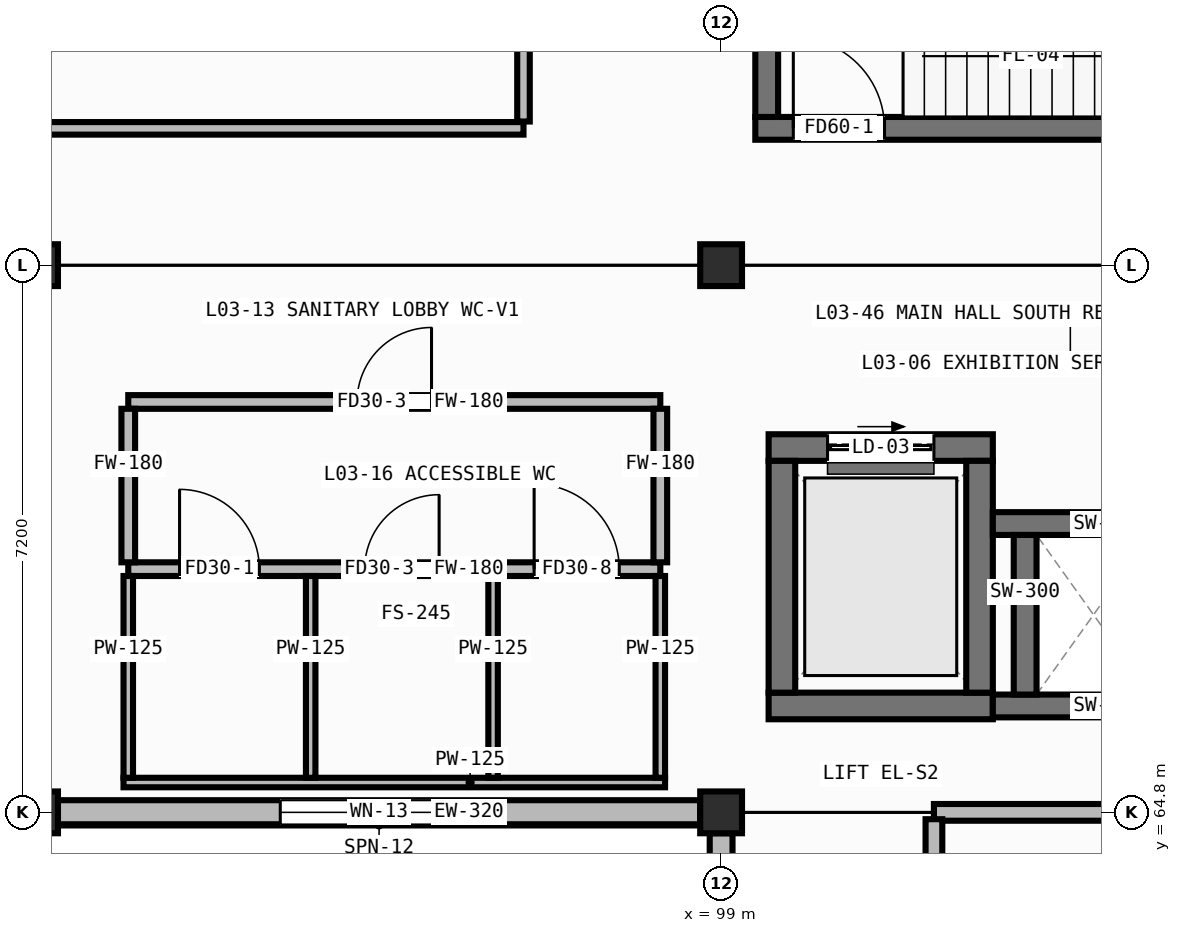
"""IFC4 building model, lengths in metres.
Left out: names, types, materials, properties, quantities, classifications, styles, units other than length and angle.
Written with IfcOpenShell. Run it as: python <this file> out.ifc"""

import sys

from ifc_helpers import new_model, si_unit, direction, frame, frame_2d, origin, origin_2d, place, context, subcontext, project, spatial, rectangle, hollow_rectangle, extrude, element, fill, save


model = new_model("IFC4")
c1 = context("Model", 3, precision=1e-05, world=origin(), true_north=direction((0.0, 1.0)))
c2 = subcontext(c1, "Body", "Model", "MODEL_VIEW")
j1 = project(units=[si_unit("LENGTHUNIT", "METRE"), si_unit("PLANEANGLEUNIT", "RADIAN")], contexts=[c1])
p1 = place(None, origin())
s1 = spatial("IfcSite", under=j1, at=p1, CompositionType="ELEMENT")
p2 = place(p1, origin())
s2 = spatial("IfcBuilding", under=s1, at=p2, CompositionType="ELEMENT")
p3 = place(p2, frame((0.0, 0.0, 8.8)))
s3 = spatial("IfcBuildingStorey", under=s2, at=p3, CompositionType="ELEMENT", Elevation=8.8)
for number, where, z_axis, x_axis in (
    (1, (90.0, 64.8, 0.0), (0.0, 0.0, 1.0), (1.0, 0.0, 0.0)),
    (2, (90.0, 72.0, 0.0), (0.0, 0.0, 1.0), (1.0, 0.0, 0.0)),
):
    element("IfcColumn", number, at=place(p3, frame(where, z_axis=z_axis, x_axis=x_axis)), inside=s3, PredefinedType="COLUMN", context=c2, shape_type="SweptSolid", body=[
        extrude(hollow_rectangle(XDim=0.55, YDim=0.55, WallThickness=0.022, at=origin_2d()), origin(), (0.0, 0.0, 1.0), 4.0),
    ])
for number, where, z_axis, x_axis in (
    (3, (99.0, 64.8, 0.0), (0.0, 0.0, 1.0), (1.0, 0.0, 0.0)),
    (4, (99.0, 72.0, 0.0), (0.0, 0.0, 1.0), (1.0, 0.0, 0.0)),
):
    element("IfcColumn", number, at=place(p3, frame(where, z_axis=z_axis, x_axis=x_axis)), inside=s3, PredefinedType="COLUMN", context=c2, shape_type="SweptSolid", body=[
        extrude(hollow_rectangle(XDim=0.55, YDim=0.55, WallThickness=0.022, at=origin_2d()), origin(), (0.0, 0.0, 1.0), 3.745),
    ])
p4 = place(p3, frame((90.275, 64.8, 0.0), z_axis=(0.0, 0.0, 1.0), x_axis=(1.0, 0.0, 0.0)))
e5 = element("IfcWall", 5, at=p4, inside=s3, PredefinedType="STANDARD", context=c2, shape_type="SweptSolid", body=[
    extrude(rectangle(XDim=8.45, YDim=0.32, at=frame_2d((4.225, 0.0))), origin(), (0.0, 0.0, 1.0), 3.295),
])
p5 = place(p4, frame((2.925, 0.0, 0.85)))
e6 = element("IfcOpeningElement", 6, at=p5, cuts=e5, PredefinedType="OPENING", context=c2, shape_type="SweptSolid", body=[
    extrude(rectangle(XDim=2.6, YDim=1.6, at=frame_2d((1.3, 0.8))), frame((0.0, 0.172, 0.0), z_axis=(0.0, -1.0, 0.0), x_axis=(1.0, 0.0, 0.0)), (0.0, 0.0, 1.0), 0.344),
])
p6 = place(p3, frame((99.0, 57.875, 0.0), z_axis=(0.0, 0.0, 1.0), x_axis=(0.0, 1.0, 0.0)))
e7 = element("IfcWall", 7, at=p6, inside=s3, PredefinedType="STANDARD", context=c2, shape_type="SweptSolid", body=[
    extrude(rectangle(XDim=6.65, YDim=0.3, at=frame_2d((3.325, 0.0))), origin(), (0.0, 0.0, 1.0), 3.295),
])
p7 = place(p6, frame((2.025, 0.0, 0.85)))
e8 = element("IfcOpeningElement", 8, at=p7, cuts=e7, PredefinedType="OPENING", context=c2, shape_type="SweptSolid", body=[
    extrude(rectangle(XDim=2.6, YDim=1.6, at=frame_2d((1.3, 0.8))), frame((0.0, 0.162, 0.0), z_axis=(0.0, -1.0, 0.0), x_axis=(1.0, 0.0, 0.0)), (0.0, 0.0, 1.0), 0.324),
])
p8 = place(p3, frame((99.45, 73.8, 0.0), z_axis=(0.0, 0.0, 1.0), x_axis=(1.0, 0.0, 0.0)))
e9 = element("IfcWall", 9, at=p8, inside=s3, PredefinedType="SHEAR", context=c2, shape_type="SweptSolid", body=[
    extrude(rectangle(XDim=8.1, YDim=0.3, at=frame_2d((4.05, 0.0))), origin(), (0.0, 0.0, 1.0), 3.745),
])
p9 = place(p8, frame((0.5, 0.0, 0.0)))
e10 = element("IfcOpeningElement", 10, at=p9, cuts=e9, PredefinedType="OPENING", context=c2, shape_type="SweptSolid", body=[
    extrude(rectangle(XDim=1.2, YDim=2.1, at=frame_2d((0.6, 1.05))), frame((0.0, 0.162, 0.0), z_axis=(0.0, -1.0, 0.0), x_axis=(1.0, 0.0, 0.0)), (0.0, 0.0, 1.0), 0.324),
])
p10 = place(p3, frame((99.6, 73.95, 0.0), z_axis=(0.0, 0.0, 1.0), x_axis=(0.0, 1.0, 0.0)))
e11 = element("IfcWall", 11, at=p10, inside=s3, PredefinedType="SHEAR", context=c2, shape_type="SweptSolid", body=[
    extrude(rectangle(XDim=3.8, YDim=0.3, at=frame_2d((1.9, 0.0))), origin(), (0.0, 0.0, 1.0), 3.745),
])
p11 = place(p3, frame((99.625, 66.2, 0.0), z_axis=(0.0, 0.0, 1.0), x_axis=(1.0, 0.0, 0.0)))
e12 = element("IfcWall", 12, at=p11, inside=s3, PredefinedType="SHEAR", context=c2, shape_type="SweptSolid", body=[
    extrude(rectangle(XDim=2.95, YDim=0.35, at=frame_2d((1.475, 0.0))), origin(), (0.0, 0.0, 1.0), 3.745),
])
p12 = place(p3, frame((99.625, 69.6, 0.0), z_axis=(0.0, 0.0, 1.0), x_axis=(1.0, 0.0, 0.0)))
e13 = element("IfcWall", 13, at=p12, inside=s3, PredefinedType="SHEAR", context=c2, shape_type="SweptSolid", body=[
    extrude(rectangle(XDim=2.95, YDim=0.35, at=frame_2d((1.475, 0.0))), origin(), (0.0, 0.0, 1.0), 3.745),
])
p13 = place(p12, frame((0.775, 0.0, 0.0)))
e14 = element("IfcOpeningElement", 14, at=p13, cuts=e13, PredefinedType="OPENING", context=c2, shape_type="SweptSolid", body=[
    extrude(rectangle(XDim=1.4, YDim=2.15, at=frame_2d((0.7, 1.075))), frame((0.0, 0.187, 0.0), z_axis=(0.0, -1.0, 0.0), x_axis=(1.0, 0.0, 0.0)), (0.0, 0.0, 1.0), 0.374),
])
for number, where, z_axis, x_axis in (
    (15, (99.8, 66.375, 0.0), (0.0, 0.0, 1.0), (0.0, 1.0, 0.0)),
    (16, (102.4, 66.375, 0.0), (0.0, 0.0, 1.0), (0.0, 1.0, 0.0)),
):
    element("IfcWall", number, at=place(p3, frame(where, z_axis=z_axis, x_axis=x_axis)), inside=s3, PredefinedType="SHEAR", context=c2, shape_type="SweptSolid", body=[
        extrude(rectangle(XDim=3.05, YDim=0.35, at=frame_2d((1.525, 0.0))), origin(), (0.0, 0.0, 1.0), 3.745),
    ])
for number, where, z_axis, x_axis in (
    (17, (102.575, 66.2, 0.0), (0.0, 0.0, 1.0), (1.0, 0.0, 0.0)),
    (18, (102.575, 68.6, 0.0), (0.0, 0.0, 1.0), (1.0, 0.0, 0.0)),
):
    element("IfcWall", number, at=place(p3, frame(where, z_axis=z_axis, x_axis=x_axis)), inside=s3, PredefinedType="SHEAR", context=c2, shape_type="SweptSolid", body=[
        extrude(rectangle(XDim=2.375, YDim=0.3, at=frame_2d((1.188, 0.0))), origin(), (0.0, 0.0, 1.0), 3.745),
    ])
p14 = place(p3, frame((103.0, 66.35, 0.0), z_axis=(0.0, 0.0, 1.0), x_axis=(0.0, 1.0, 0.0)))
e19 = element("IfcWall", 19, at=p14, inside=s3, PredefinedType="SHEAR", context=c2, shape_type="SweptSolid", body=[
    extrude(rectangle(XDim=2.1, YDim=0.3, at=frame_2d((1.05, 0.0))), origin(), (0.0, 0.0, 1.0), 3.745),
])
p15 = place(p3, frame((91.137, 65.192, 0.0), z_axis=(0.0, 0.0, 1.0), x_axis=(1.0, 0.0, 0.0)))
e20 = element("IfcWall", 20, at=p15, inside=s3, PredefinedType="PARTITIONING", context=c2, shape_type="SweptSolid", body=[
    extrude(rectangle(XDim=7.125, YDim=0.125, at=frame_2d((3.562, 0.0))), origin(), (0.0, 0.0, 1.0), 3.745),
])
p16 = place(p3, frame((91.2, 68.0, 0.0), z_axis=(0.0, 0.0, 1.0), x_axis=(1.0, 0.0, 0.0)))
e21 = element("IfcWall", 21, at=p16, inside=s3, PredefinedType="PARTITIONING", context=c2, shape_type="SweptSolid", body=[
    extrude(rectangle(XDim=7.0, YDim=0.18, at=frame_2d((3.5, 0.0))), origin(), (0.0, 0.0, 1.0), 3.745),
])
p17 = place(p16, frame((0.675, 0.0, 0.0)))
e22 = element("IfcOpeningElement", 22, at=p17, cuts=e21, PredefinedType="OPENING", context=c2, shape_type="SweptSolid", body=[
    extrude(rectangle(XDim=1.05, YDim=2.1, at=frame_2d((0.525, 1.05))), frame((0.0, 0.102, 0.0), z_axis=(0.0, -1.0, 0.0), x_axis=(1.0, 0.0, 0.0)), (0.0, 0.0, 1.0), 0.204),
])
p18 = place(p16, frame((3.11, 0.0, 0.0)))
e23 = element("IfcOpeningElement", 23, at=p18, cuts=e21, PredefinedType="OPENING", context=c2, shape_type="SweptSolid", body=[
    extrude(rectangle(XDim=0.98, YDim=2.02, at=frame_2d((0.49, 1.01))), frame((0.0, 0.102, 0.0), z_axis=(0.0, -1.0, 0.0), x_axis=(1.0, 0.0, 0.0)), (0.0, 0.0, 1.0), 0.204),
])
p19 = place(p16, frame((5.34, 0.0, 0.0)))
e24 = element("IfcOpeningElement", 24, at=p19, cuts=e21, PredefinedType="OPENING", context=c2, shape_type="SweptSolid", body=[
    extrude(rectangle(XDim=1.12, YDim=2.08, at=frame_2d((0.56, 1.04))), frame((0.0, 0.102, 0.0), z_axis=(0.0, -1.0, 0.0), x_axis=(1.0, 0.0, 0.0)), (0.0, 0.0, 1.0), 0.204),
])
p20 = place(p3, frame((91.2, 70.2, 0.0), z_axis=(0.0, 0.0, 1.0), x_axis=(1.0, 0.0, 0.0)))
e25 = element("IfcWall", 25, at=p20, inside=s3, PredefinedType="PARTITIONING", context=c2, shape_type="SweptSolid", body=[
    extrude(rectangle(XDim=7.0, YDim=0.18, at=frame_2d((3.5, 0.0))), origin(), (0.0, 0.0, 1.0), 3.745),
])
p21 = place(p20, frame((3.01, 0.0, 0.0)))
e26 = element("IfcOpeningElement", 26, at=p21, cuts=e25, PredefinedType="OPENING", context=c2, shape_type="SweptSolid", body=[
    extrude(rectangle(XDim=0.98, YDim=2.02, at=frame_2d((0.49, 1.01))), frame((0.0, 0.102, 0.0), z_axis=(0.0, -1.0, 0.0), x_axis=(1.0, 0.0, 0.0)), (0.0, 0.0, 1.0), 0.204),
])
for number, where, z_axis, x_axis in (
    (27, (91.2, 68.09, 0.0), (0.0, 0.0, 1.0), (0.0, 1.0, 0.0)),
    (28, (98.2, 68.09, 0.0), (0.0, 0.0, 1.0), (0.0, 1.0, 0.0)),
):
    element("IfcWall", number, at=place(p3, frame(where, z_axis=z_axis, x_axis=x_axis)), inside=s3, PredefinedType="PARTITIONING", context=c2, shape_type="SweptSolid", body=[
        extrude(rectangle(XDim=2.02, YDim=0.18, at=frame_2d((1.01, 0.0))), origin(), (0.0, 0.0, 1.0), 3.745),
    ])
for number, where, z_axis, x_axis in (
    (29, (91.2, 65.255, 0.0), (0.0, 0.0, 1.0), (0.0, 1.0, 0.0)),
    (30, (93.6, 65.255, 0.0), (0.0, 0.0, 1.0), (0.0, 1.0, 0.0)),
    (31, (96.0, 65.255, 0.0), (0.0, 0.0, 1.0), (0.0, 1.0, 0.0)),
    (32, (98.2, 65.255, 0.0), (0.0, 0.0, 1.0), (0.0, 1.0, 0.0)),
):
    element("IfcWall", number, at=place(p3, frame(where, z_axis=z_axis, x_axis=x_axis)), inside=s3, PredefinedType="PARTITIONING", context=c2, shape_type="SweptSolid", body=[
        extrude(rectangle(XDim=2.655, YDim=0.125, at=frame_2d((1.328, 0.0))), origin(), (0.0, 0.0, 1.0), 3.745),
    ])
p22 = place(p3, frame((101.8, 64.8, 0.0), z_axis=(0.0, 0.0, 1.0), x_axis=(1.0, 0.0, 0.0)))
e33 = element("IfcWall", 33, at=p22, inside=s3, PredefinedType="PARTITIONING", context=c2, shape_type="SweptSolid", body=[
    extrude(rectangle(XDim=5.745, YDim=0.22, at=frame_2d((2.873, 0.0))), origin(), (0.0, 0.0, 1.0), 3.025),
])
p23 = place(p3, frame((101.8, 36.09, 0.0), z_axis=(0.0, 0.0, 1.0), x_axis=(0.0, 1.0, 0.0)))
e34 = element("IfcWall", 34, at=p23, inside=s3, PredefinedType="PARTITIONING", context=c2, shape_type="SweptSolid", body=[
    extrude(rectangle(XDim=28.62, YDim=0.22, at=frame_2d((14.31, 0.0))), origin(), (0.0, 0.0, 1.0), 3.745),
])
p24 = place(p23, frame((15.11, 0.0, 0.0)))
e35 = element("IfcOpeningElement", 35, at=p24, cuts=e34, PredefinedType="OPENING", context=c2, shape_type="SweptSolid", body=[
    extrude(rectangle(XDim=1.35, YDim=2.08, at=frame_2d((0.675, 1.04))), frame((0.0, 0.122, 0.0), z_axis=(0.0, -1.0, 0.0), x_axis=(1.0, 0.0, 0.0)), (0.0, 0.0, 1.0), 0.244),
])
p25 = place(p3, frame((62.8, 73.8, 0.0), z_axis=(0.0, 0.0, 1.0), x_axis=(1.0, 0.0, 0.0)))
e36 = element("IfcWall", 36, at=p25, inside=s3, PredefinedType="PARTITIONING", context=c2, shape_type="SweptSolid", body=[
    extrude(rectangle(XDim=33.6, YDim=0.165, at=frame_2d((16.8, 0.0))), origin(), (0.0, 0.0, 1.0), 3.745),
])
p26 = place(p25, frame((12.85, 0.0, 0.0)))
e37 = element("IfcOpeningElement", 37, at=p26, cuts=e36, PredefinedType="OPENING", context=c2, shape_type="SweptSolid", body=[
    extrude(rectangle(XDim=1.7, YDim=2.12, at=frame_2d((0.85, 1.06))), frame((0.0, 0.094, 0.0), z_axis=(0.0, -1.0, 0.0), x_axis=(1.0, 0.0, 0.0)), (0.0, 0.0, 1.0), 0.189),
])
p27 = place(p3, frame((96.4, 73.89, 0.0), z_axis=(0.0, 0.0, 1.0), x_axis=(0.0, 1.0, 0.0)))
e38 = element("IfcWall", 38, at=p27, inside=s3, PredefinedType="PARTITIONING", context=c2, shape_type="SweptSolid", body=[
    extrude(rectangle(XDim=19.545, YDim=0.165, at=frame_2d((9.772, 0.0))), origin(), (0.0, 0.0, 1.0), 3.745),
])
p28 = place(p5, origin())
e39 = element("IfcWindow", 39, at=p28, inside=s3, PartitioningType="DOUBLE_PANEL_VERTICAL", PredefinedType="WINDOW", context=c2, shape_type="SweptSolid", body=[
    extrude(rectangle(XDim=2.6, YDim=1.6, at=frame_2d((1.3, 0.8))), frame((0.0, 0.03, 0.0), z_axis=(0.0, -1.0, 0.0), x_axis=(1.0, 0.0, 0.0)), (0.0, 0.0, 1.0), 0.06),
])
fill(e6, e39)
p29 = place(p9, origin())
e40 = element("IfcDoor", 40, at=p29, inside=s3, OperationType="SINGLE_SWING_LEFT", PredefinedType="DOOR", context=c2, shape_type="SweptSolid", body=[
    extrude(rectangle(XDim=1.2, YDim=2.1, at=frame_2d((0.6, 1.05))), frame((0.0, 0.025, 0.0), z_axis=(0.0, -1.0, 0.0), x_axis=(1.0, 0.0, 0.0)), (0.0, 0.0, 1.0), 0.05),
])
fill(e10, e40)
p30 = place(p13, origin())
e41 = element("IfcDoor", 41, at=p30, inside=s3, OperationType="SLIDING_TO_RIGHT", PredefinedType="DOOR", context=c2, shape_type="SweptSolid", body=[
    extrude(rectangle(XDim=1.4, YDim=2.15, at=frame_2d((0.7, 1.075))), frame((0.0, 0.025, 0.0), z_axis=(0.0, -1.0, 0.0), x_axis=(1.0, 0.0, 0.0)), (0.0, 0.0, 1.0), 0.05),
])
fill(e14, e41)
p31 = place(p21, origin())
e42 = element("IfcDoor", 42, at=p31, inside=s3, OperationType="SINGLE_SWING_RIGHT", PredefinedType="DOOR", context=c2, shape_type="SweptSolid", body=[
    extrude(rectangle(XDim=0.98, YDim=2.02, at=frame_2d((0.49, 1.01))), frame((0.0, 0.025, 0.0), z_axis=(0.0, -1.0, 0.0), x_axis=(1.0, 0.0, 0.0)), (0.0, 0.0, 1.0), 0.05),
])
fill(e26, e42)
p32 = place(p17, origin())
e43 = element("IfcDoor", 43, at=p32, inside=s3, OperationType="SINGLE_SWING_LEFT", PredefinedType="DOOR", context=c2, shape_type="SweptSolid", body=[
    extrude(rectangle(XDim=1.05, YDim=2.1, at=frame_2d((0.525, 1.05))), frame((0.0, 0.025, 0.0), z_axis=(0.0, -1.0, 0.0), x_axis=(1.0, 0.0, 0.0)), (0.0, 0.0, 1.0), 0.05),
])
fill(e22, e43)
p33 = place(p18, origin())
e44 = element("IfcDoor", 44, at=p33, inside=s3, OperationType="SINGLE_SWING_RIGHT", PredefinedType="DOOR", context=c2, shape_type="SweptSolid", body=[
    extrude(rectangle(XDim=0.98, YDim=2.02, at=frame_2d((0.49, 1.01))), frame((0.0, 0.025, 0.0), z_axis=(0.0, -1.0, 0.0), x_axis=(1.0, 0.0, 0.0)), (0.0, 0.0, 1.0), 0.05),
])
fill(e23, e44)
p34 = place(p19, origin())
e45 = element("IfcDoor", 45, at=p34, inside=s3, OperationType="SINGLE_SWING_LEFT", PredefinedType="DOOR", context=c2, shape_type="SweptSolid", body=[
    extrude(rectangle(XDim=1.12, YDim=2.08, at=frame_2d((0.56, 1.04))), frame((0.0, 0.025, 0.0), z_axis=(0.0, -1.0, 0.0), x_axis=(1.0, 0.0, 0.0)), (0.0, 0.0, 1.0), 0.05),
])
fill(e24, e45)
save(model, sys.argv[1])
